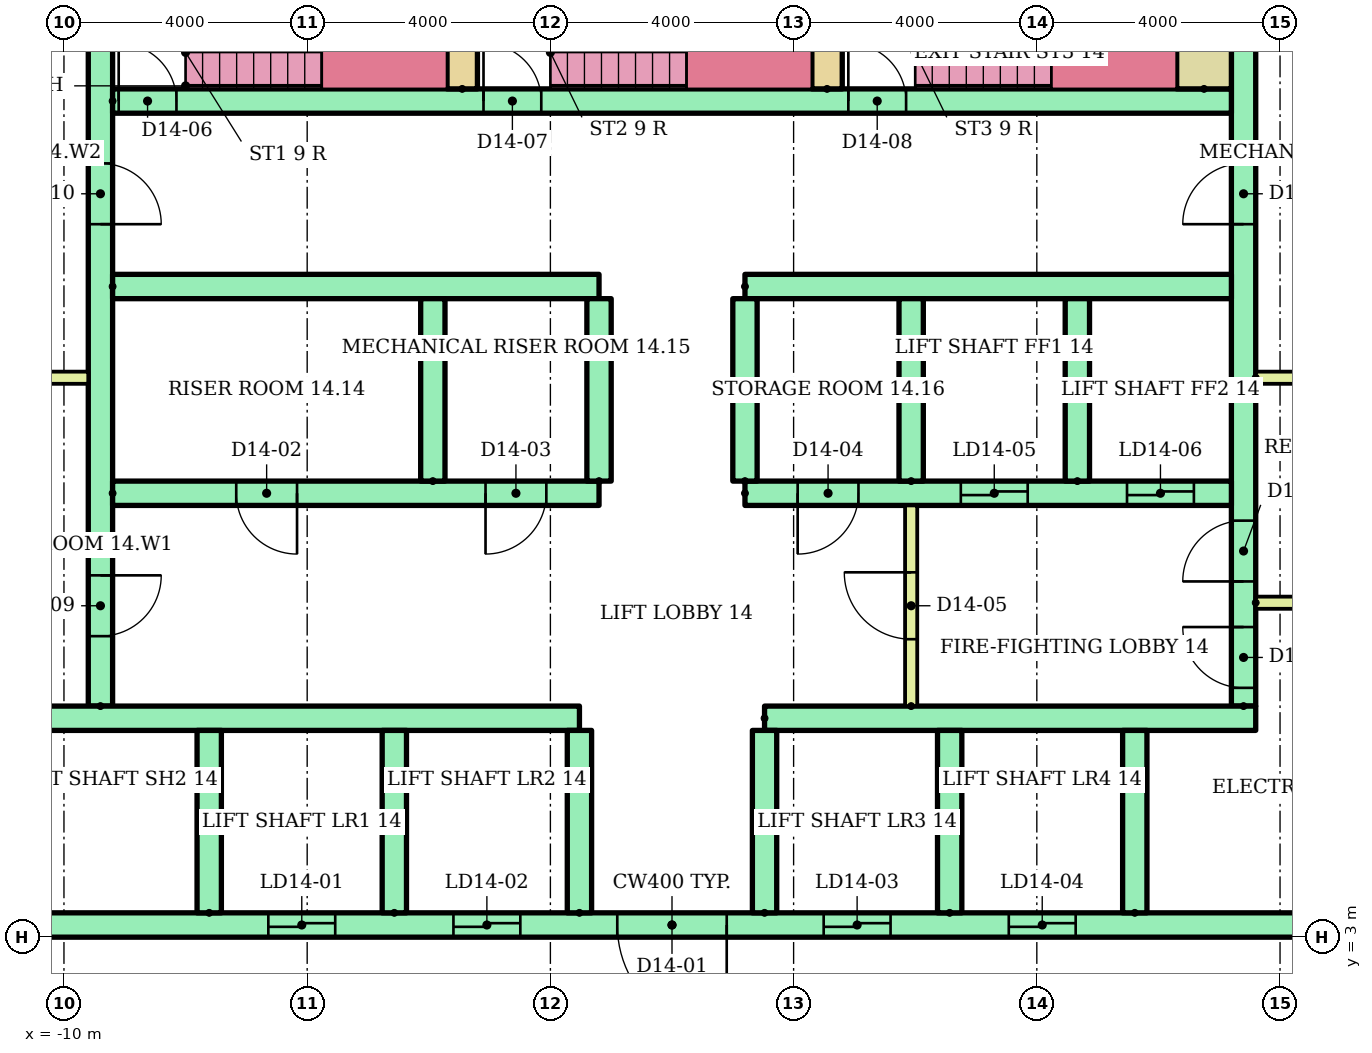
"""IFC4 building model, lengths in metres.
Left out: names, types, materials, properties, quantities, classifications, styles, units other than length and angle.
Written with IfcOpenShell. Run it as: python <this file> out.ifc"""

import sys

from ifc_helpers import new_model, si_unit, direction, frame, frame_2d, origin, place, context, subcontext, project, spatial, rectangle, extrude, element, fill, save


model = new_model("IFC4")
c1 = context("Model", 3, precision=1e-05, world=origin(), true_north=direction((0.0, 1.0)))
c2 = subcontext(c1, "Body", "Model", "MODEL_VIEW")
j1 = project(units=[si_unit("LENGTHUNIT", "METRE"), si_unit("PLANEANGLEUNIT", "RADIAN")], contexts=[c1])
p1 = place(None, origin())
s1 = spatial("IfcSite", under=j1, at=p1, CompositionType="ELEMENT")
p2 = place(p1, origin())
s2 = spatial("IfcBuilding", under=s1, at=p2, CompositionType="ELEMENT")
p3 = place(p2, frame((0.0, 0.0, 54.4)))
s3 = spatial("IfcBuildingStorey", under=s2, at=p3, CompositionType="ELEMENT", Elevation=54.4)
p4 = place(p3, frame((-9.4, 6.8, 0.0), z_axis=(0.0, 0.0, 1.0), x_axis=(0.0, 1.0, 0.0)))
e1 = element("IfcWall", 1, at=p4, inside=s3, PredefinedType="SHEAR", context=c2, shape_type="SweptSolid", body=[
    extrude(rectangle(XDim=12.7, YDim=0.4, at=frame_2d((6.35, 0.0))), origin(), (0.0, 0.0, 1.0), 2.92),
])
p5 = place(p4, frame((1.15, 0.0, 0.0)))
e2 = element("IfcOpeningElement", 2, at=p5, cuts=e1, PredefinedType="OPENING", context=c2, shape_type="SweptSolid", body=[
    extrude(rectangle(XDim=1.0, YDim=2.1, at=frame_2d((0.5, 1.05))), frame((0.0, 0.21, 0.0), z_axis=(0.0, -1.0, 0.0), x_axis=(1.0, 0.0, 0.0)), (0.0, 0.0, 1.0), 0.42),
])
p6 = place(p4, frame((7.925, 0.0, 0.0)))
e3 = element("IfcOpeningElement", 3, at=p6, cuts=e1, PredefinedType="OPENING", context=c2, shape_type="SweptSolid", body=[
    extrude(rectangle(XDim=1.0, YDim=2.1, at=frame_2d((0.5, 1.05))), frame((0.0, 0.21, 0.0), z_axis=(0.0, -1.0, 0.0), x_axis=(1.0, 0.0, 0.0)), (0.0, 0.0, 1.0), 0.42),
])
p7 = place(p3, frame((9.4, 6.8, 0.0), z_axis=(0.0, 0.0, 1.0), x_axis=(0.0, 1.0, 0.0)))
e4 = element("IfcWall", 4, at=p7, inside=s3, PredefinedType="SHEAR", context=c2, shape_type="SweptSolid", body=[
    extrude(rectangle(XDim=12.7, YDim=0.4, at=frame_2d((6.35, 0.0))), origin(), (0.0, 0.0, 1.0), 2.92),
])
p8 = place(p7, frame((0.3, 0.0, 0.0)))
e5 = element("IfcOpeningElement", 5, at=p8, cuts=e4, PredefinedType="OPENING", context=c2, shape_type="SweptSolid", body=[
    extrude(rectangle(XDim=1.0, YDim=2.1, at=frame_2d((0.5, 1.05))), frame((0.0, 0.21, 0.0), z_axis=(0.0, -1.0, 0.0), x_axis=(1.0, 0.0, 0.0)), (0.0, 0.0, 1.0), 0.42),
])
p9 = place(p7, frame((2.05, 0.0, 0.0)))
e6 = element("IfcOpeningElement", 6, at=p9, cuts=e4, PredefinedType="OPENING", context=c2, shape_type="SweptSolid", body=[
    extrude(rectangle(XDim=1.0, YDim=2.1, at=frame_2d((0.5, 1.05))), frame((0.0, 0.21, 0.0), z_axis=(0.0, -1.0, 0.0), x_axis=(1.0, 0.0, 0.0)), (0.0, 0.0, 1.0), 0.42),
])
p10 = place(p7, frame((7.925, 0.0, 0.0)))
e7 = element("IfcOpeningElement", 7, at=p10, cuts=e4, PredefinedType="OPENING", context=c2, shape_type="SweptSolid", body=[
    extrude(rectangle(XDim=1.0, YDim=2.1, at=frame_2d((0.5, 1.05))), frame((0.0, 0.21, 0.0), z_axis=(0.0, -1.0, 0.0), x_axis=(1.0, 0.0, 0.0)), (0.0, 0.0, 1.0), 0.42),
])
p11 = place(p3, frame((-13.5, 3.2, 0.0)))
e8 = element("IfcWall", 8, at=p11, inside=s3, PredefinedType="SHEAR", context=c2, shape_type="SweptSolid", body=[
    extrude(rectangle(XDim=27.0, YDim=0.4, at=frame_2d((13.5, 0.0))), origin(), (0.0, 0.0, 1.0), 2.92),
])
p12 = place(p11, frame((6.861, 0.0, 0.0)))
e9 = element("IfcOpeningElement", 9, at=p12, cuts=e8, PredefinedType="OPENING", context=c2, shape_type="SweptSolid", body=[
    extrude(rectangle(XDim=1.1, YDim=2.1, at=frame_2d((0.55, 1.05))), frame((0.0, 0.21, 0.0), z_axis=(0.0, -1.0, 0.0), x_axis=(1.0, 0.0, 0.0)), (0.0, 0.0, 1.0), 0.42),
])
p13 = place(p11, frame((9.906, 0.0, 0.0)))
e10 = element("IfcOpeningElement", 10, at=p13, cuts=e8, PredefinedType="OPENING", context=c2, shape_type="SweptSolid", body=[
    extrude(rectangle(XDim=1.1, YDim=2.1, at=frame_2d((0.55, 1.05))), frame((0.0, 0.21, 0.0), z_axis=(0.0, -1.0, 0.0), x_axis=(1.0, 0.0, 0.0)), (0.0, 0.0, 1.0), 0.42),
])
p14 = place(p11, frame((15.994, 0.0, 0.0)))
e11 = element("IfcOpeningElement", 11, at=p14, cuts=e8, PredefinedType="OPENING", context=c2, shape_type="SweptSolid", body=[
    extrude(rectangle(XDim=1.1, YDim=2.1, at=frame_2d((0.55, 1.05))), frame((0.0, 0.21, 0.0), z_axis=(0.0, -1.0, 0.0), x_axis=(1.0, 0.0, 0.0)), (0.0, 0.0, 1.0), 0.42),
])
p15 = place(p11, frame((19.039, 0.0, 0.0)))
e12 = element("IfcOpeningElement", 12, at=p15, cuts=e8, PredefinedType="OPENING", context=c2, shape_type="SweptSolid", body=[
    extrude(rectangle(XDim=1.1, YDim=2.1, at=frame_2d((0.55, 1.05))), frame((0.0, 0.21, 0.0), z_axis=(0.0, -1.0, 0.0), x_axis=(1.0, 0.0, 0.0)), (0.0, 0.0, 1.0), 0.42),
])
p16 = place(p11, frame((12.6, 0.0, 0.0)))
e13 = element("IfcOpeningElement", 13, at=p16, cuts=e8, PredefinedType="OPENING", context=c2, shape_type="SweptSolid", body=[
    extrude(rectangle(XDim=1.8, YDim=2.1, at=frame_2d((0.9, 1.05))), frame((0.0, 0.21, 0.0), z_axis=(0.0, -1.0, 0.0), x_axis=(1.0, 0.0, 0.0)), (0.0, 0.0, 1.0), 0.42),
])
p17 = place(p3, frame((-13.5, 6.6, 0.0)))
e14 = element("IfcWall", 14, at=p17, inside=s3, PredefinedType="SHEAR", context=c2, shape_type="SweptSolid", body=[
    extrude(rectangle(XDim=11.978, YDim=0.4, at=frame_2d((5.989, 0.0))), origin(), (0.0, 0.0, 1.0), 2.92),
])
p18 = place(p3, frame((1.522, 6.6, 0.0)))
e15 = element("IfcWall", 15, at=p18, inside=s3, PredefinedType="SHEAR", context=c2, shape_type="SweptSolid", body=[
    extrude(rectangle(XDim=8.078, YDim=0.4, at=frame_2d((4.039, 0.0))), origin(), (0.0, 0.0, 1.0), 2.92),
])
for number, where, z_axis, x_axis in (
    (16, (-7.611, 3.4, 0.0), (0.0, 0.0, 1.0), (0.0, 1.0, 0.0)),
    (17, (-4.567, 3.4, 0.0), (0.0, 0.0, 1.0), (0.0, 1.0, 0.0)),
    (18, (-1.522, 3.4, 0.0), (0.0, 0.0, 1.0), (0.0, 1.0, 0.0)),
    (19, (1.522, 3.4, 0.0), (0.0, 0.0, 1.0), (0.0, 1.0, 0.0)),
    (20, (4.567, 3.4, 0.0), (0.0, 0.0, 1.0), (0.0, 1.0, 0.0)),
    (21, (7.611, 3.4, 0.0), (0.0, 0.0, 1.0), (0.0, 1.0, 0.0)),
):
    element("IfcWall", number, at=place(p3, frame(where, z_axis=z_axis, x_axis=x_axis)), inside=s3, PredefinedType="SHEAR", context=c2, shape_type="SweptSolid", body=[
        extrude(rectangle(XDim=3.0, YDim=0.4, at=frame_2d((1.5, 0.0))), origin(), (0.0, 0.0, 1.0), 2.92),
    ])
p19 = place(p3, frame((-9.2, 10.3, 0.0)))
e22 = element("IfcWall", 22, at=p19, inside=s3, PredefinedType="SHEAR", context=c2, shape_type="SweptSolid", body=[
    extrude(rectangle(XDim=8.0, YDim=0.4, at=frame_2d((4.0, 0.0))), origin(), (0.0, 0.0, 1.0), 2.92),
])
p20 = place(p19, frame((2.033, 0.0, 0.0)))
e23 = element("IfcOpeningElement", 23, at=p20, cuts=e22, PredefinedType="OPENING", context=c2, shape_type="SweptSolid", body=[
    extrude(rectangle(XDim=1.0, YDim=2.1, at=frame_2d((0.5, 1.05))), frame((0.0, 0.21, 0.0), z_axis=(0.0, -1.0, 0.0), x_axis=(1.0, 0.0, 0.0)), (0.0, 0.0, 1.0), 0.42),
])
p21 = place(p19, frame((6.133, 0.0, 0.0)))
e24 = element("IfcOpeningElement", 24, at=p21, cuts=e22, PredefinedType="OPENING", context=c2, shape_type="SweptSolid", body=[
    extrude(rectangle(XDim=1.0, YDim=2.1, at=frame_2d((0.5, 1.05))), frame((0.0, 0.21, 0.0), z_axis=(0.0, -1.0, 0.0), x_axis=(1.0, 0.0, 0.0)), (0.0, 0.0, 1.0), 0.42),
])
p22 = place(p3, frame((-9.2, 13.7, 0.0)))
e25 = element("IfcWall", 25, at=p22, inside=s3, PredefinedType="SHEAR", context=c2, shape_type="SweptSolid", body=[
    extrude(rectangle(XDim=8.0, YDim=0.4, at=frame_2d((4.0, 0.0))), origin(), (0.0, 0.0, 1.0), 2.92),
])
p23 = place(p3, frame((1.2, 10.3, 0.0)))
e26 = element("IfcWall", 26, at=p23, inside=s3, PredefinedType="SHEAR", context=c2, shape_type="SweptSolid", body=[
    extrude(rectangle(XDim=8.0, YDim=0.4, at=frame_2d((4.0, 0.0))), origin(), (0.0, 0.0, 1.0), 2.92),
])
p24 = place(p23, frame((3.55, 0.0, 0.0)))
e27 = element("IfcOpeningElement", 27, at=p24, cuts=e26, PredefinedType="OPENING", context=c2, shape_type="SweptSolid", body=[
    extrude(rectangle(XDim=1.1, YDim=2.1, at=frame_2d((0.55, 1.05))), frame((0.0, 0.21, 0.0), z_axis=(0.0, -1.0, 0.0), x_axis=(1.0, 0.0, 0.0)), (0.0, 0.0, 1.0), 0.42),
])
p25 = place(p23, frame((6.283, 0.0, 0.0)))
e28 = element("IfcOpeningElement", 28, at=p25, cuts=e26, PredefinedType="OPENING", context=c2, shape_type="SweptSolid", body=[
    extrude(rectangle(XDim=1.1, YDim=2.1, at=frame_2d((0.55, 1.05))), frame((0.0, 0.21, 0.0), z_axis=(0.0, -1.0, 0.0), x_axis=(1.0, 0.0, 0.0)), (0.0, 0.0, 1.0), 0.42),
])
p26 = place(p23, frame((0.867, 0.0, 0.0)))
e29 = element("IfcOpeningElement", 29, at=p26, cuts=e26, PredefinedType="OPENING", context=c2, shape_type="SweptSolid", body=[
    extrude(rectangle(XDim=1.0, YDim=2.1, at=frame_2d((0.5, 1.05))), frame((0.0, 0.21, 0.0), z_axis=(0.0, -1.0, 0.0), x_axis=(1.0, 0.0, 0.0)), (0.0, 0.0, 1.0), 0.42),
])
p27 = place(p3, frame((1.2, 13.7, 0.0)))
e30 = element("IfcWall", 30, at=p27, inside=s3, PredefinedType="SHEAR", context=c2, shape_type="SweptSolid", body=[
    extrude(rectangle(XDim=8.0, YDim=0.4, at=frame_2d((4.0, 0.0))), origin(), (0.0, 0.0, 1.0), 2.92),
])
for number, where, z_axis, x_axis in (
    (31, (-3.933, 10.5, 0.0), (0.0, 0.0, 1.0), (0.0, 1.0, 0.0)),
    (32, (-1.2, 10.5, 0.0), (0.0, 0.0, 1.0), (0.0, 1.0, 0.0)),
    (33, (1.2, 10.5, 0.0), (0.0, 0.0, 1.0), (0.0, 1.0, 0.0)),
    (34, (3.933, 10.5, 0.0), (0.0, 0.0, 1.0), (0.0, 1.0, 0.0)),
    (35, (6.667, 10.5, 0.0), (0.0, 0.0, 1.0), (0.0, 1.0, 0.0)),
):
    element("IfcWall", number, at=place(p3, frame(where, z_axis=z_axis, x_axis=x_axis)), inside=s3, PredefinedType="SHEAR", context=c2, shape_type="SweptSolid", body=[
        extrude(rectangle(XDim=3.0, YDim=0.4, at=frame_2d((1.5, 0.0))), origin(), (0.0, 0.0, 1.0), 2.92),
    ])
p28 = place(p3, frame((3.933, 6.8, 0.0), z_axis=(0.0, 0.0, 1.0), x_axis=(0.0, 1.0, 0.0)))
e36 = element("IfcWall", 36, at=p28, inside=s3, PredefinedType="PARTITIONING", context=c2, shape_type="SweptSolid", body=[
    extrude(rectangle(XDim=3.3, YDim=0.2, at=frame_2d((1.65, 0.0))), origin(), (0.0, 0.0, 1.0), 2.92),
])
p29 = place(p28, frame((1.1, 0.0, 0.0)))
e37 = element("IfcOpeningElement", 37, at=p29, cuts=e36, PredefinedType="OPENING", context=c2, shape_type="SweptSolid", body=[
    extrude(rectangle(XDim=1.1, YDim=2.1, at=frame_2d((0.55, 1.05))), frame((0.0, 0.11, 0.0), z_axis=(0.0, -1.0, 0.0), x_axis=(1.0, 0.0, 0.0)), (0.0, 0.0, 1.0), 0.22),
])
p30 = place(p3, frame((-9.2, 16.75, 0.0)))
e38 = element("IfcWall", 38, at=p30, inside=s3, PredefinedType="SHEAR", context=c2, shape_type="SweptSolid", body=[
    extrude(rectangle(XDim=18.4, YDim=0.4, at=frame_2d((9.2, 0.0))), origin(), (0.0, 0.0, 1.0), 2.92),
])
p31 = place(p30, frame((0.1, 0.0, 0.0)))
e39 = element("IfcOpeningElement", 39, at=p31, cuts=e38, PredefinedType="OPENING", context=c2, shape_type="SweptSolid", body=[
    extrude(rectangle(XDim=0.95, YDim=2.1, at=frame_2d((0.475, 1.05))), frame((0.0, 0.21, 0.0), z_axis=(0.0, -1.0, 0.0), x_axis=(1.0, 0.0, 0.0)), (0.0, 0.0, 1.0), 0.42),
])
p32 = place(p30, frame((6.1, 0.0, 0.0)))
e40 = element("IfcOpeningElement", 40, at=p32, cuts=e38, PredefinedType="OPENING", context=c2, shape_type="SweptSolid", body=[
    extrude(rectangle(XDim=0.95, YDim=2.1, at=frame_2d((0.475, 1.05))), frame((0.0, 0.21, 0.0), z_axis=(0.0, -1.0, 0.0), x_axis=(1.0, 0.0, 0.0)), (0.0, 0.0, 1.0), 0.42),
])
p33 = place(p30, frame((12.1, 0.0, 0.0)))
e41 = element("IfcOpeningElement", 41, at=p33, cuts=e38, PredefinedType="OPENING", context=c2, shape_type="SweptSolid", body=[
    extrude(rectangle(XDim=0.95, YDim=2.1, at=frame_2d((0.475, 1.05))), frame((0.0, 0.21, 0.0), z_axis=(0.0, -1.0, 0.0), x_axis=(1.0, 0.0, 0.0)), (0.0, 0.0, 1.0), 0.42),
])
for number, where, z_axis, x_axis in (
    (42, (-3.45, 16.95, 0.0), (0.0, 0.0, 1.0), (0.0, 1.0, 0.0)),
    (43, (2.55, 16.95, 0.0), (0.0, 0.0, 1.0), (0.0, 1.0, 0.0)),
):
    element("IfcWall", number, at=place(p3, frame(where, z_axis=z_axis, x_axis=x_axis)), inside=s3, PredefinedType="SHEAR", context=c2, shape_type="SweptSolid", body=[
        extrude(rectangle(XDim=2.55, YDim=0.5, at=frame_2d((1.275, 0.0))), origin(), (0.0, 0.0, 1.0), 2.92),
    ])
p34 = place(p3, frame((8.75, 16.95, 0.0), z_axis=(0.0, 0.0, 1.0), x_axis=(0.0, 1.0, 0.0)))
e44 = element("IfcWall", 44, at=p34, inside=s3, PredefinedType="SHEAR", context=c2, shape_type="SweptSolid", body=[
    extrude(rectangle(XDim=2.55, YDim=0.9, at=frame_2d((1.275, 0.0))), origin(), (0.0, 0.0, 1.0), 2.92),
])
for number, where in (
    (45, (-13.5, 12.2, 0.0)),
    (46, (9.6, 8.5, 0.0)),
    (47, (9.6, 12.2, 0.0)),
):
    element("IfcWall", number, at=place(p3, frame(where)), inside=s3, PredefinedType="PARTITIONING", context=c2, shape_type="SweptSolid", body=[
        extrude(rectangle(XDim=3.9, YDim=0.2, at=frame_2d((1.95, 0.0))), origin(), (0.0, 0.0, 1.0), 2.92),
    ])
p35 = place(p12, origin())
e48 = element("IfcDoor", 48, at=p35, inside=s3, OperationType="SLIDING_TO_LEFT", PredefinedType="DOOR", context=c2, shape_type="SweptSolid", body=[
    extrude(rectangle(XDim=1.1, YDim=2.1, at=frame_2d((0.55, 1.05))), frame((0.0, 0.025, 0.0), z_axis=(0.0, -1.0, 0.0), x_axis=(1.0, 0.0, 0.0)), (0.0, 0.0, 1.0), 0.05),
])
fill(e9, e48)
p36 = place(p13, origin())
e49 = element("IfcDoor", 49, at=p36, inside=s3, OperationType="SLIDING_TO_LEFT", PredefinedType="DOOR", context=c2, shape_type="SweptSolid", body=[
    extrude(rectangle(XDim=1.1, YDim=2.1, at=frame_2d((0.55, 1.05))), frame((0.0, 0.025, 0.0), z_axis=(0.0, -1.0, 0.0), x_axis=(1.0, 0.0, 0.0)), (0.0, 0.0, 1.0), 0.05),
])
fill(e10, e49)
p37 = place(p14, origin())
e50 = element("IfcDoor", 50, at=p37, inside=s3, OperationType="SLIDING_TO_LEFT", PredefinedType="DOOR", context=c2, shape_type="SweptSolid", body=[
    extrude(rectangle(XDim=1.1, YDim=2.1, at=frame_2d((0.55, 1.05))), frame((0.0, 0.025, 0.0), z_axis=(0.0, -1.0, 0.0), x_axis=(1.0, 0.0, 0.0)), (0.0, 0.0, 1.0), 0.05),
])
fill(e11, e50)
p38 = place(p15, origin())
e51 = element("IfcDoor", 51, at=p38, inside=s3, OperationType="SLIDING_TO_LEFT", PredefinedType="DOOR", context=c2, shape_type="SweptSolid", body=[
    extrude(rectangle(XDim=1.1, YDim=2.1, at=frame_2d((0.55, 1.05))), frame((0.0, 0.025, 0.0), z_axis=(0.0, -1.0, 0.0), x_axis=(1.0, 0.0, 0.0)), (0.0, 0.0, 1.0), 0.05),
])
fill(e12, e51)
p39 = place(p16, frame((1.8, 0.0, 0.0), z_axis=(0.0, 0.0, 1.0), x_axis=(-1.0, 0.0, 0.0)))
e52 = element("IfcDoor", 52, at=p39, inside=s3, OperationType="DOUBLE_DOOR_SINGLE_SWING", PredefinedType="DOOR", context=c2, shape_type="SweptSolid", body=[
    extrude(rectangle(XDim=1.8, YDim=2.1, at=frame_2d((0.9, 1.05))), frame((0.0, 0.025, 0.0), z_axis=(0.0, -1.0, 0.0), x_axis=(1.0, 0.0, 0.0)), (0.0, 0.0, 1.0), 0.05),
])
fill(e13, e52)
p40 = place(p24, origin())
e53 = element("IfcDoor", 53, at=p40, inside=s3, OperationType="SLIDING_TO_LEFT", PredefinedType="DOOR", context=c2, shape_type="SweptSolid", body=[
    extrude(rectangle(XDim=1.1, YDim=2.1, at=frame_2d((0.55, 1.05))), frame((0.0, 0.025, 0.0), z_axis=(0.0, -1.0, 0.0), x_axis=(1.0, 0.0, 0.0)), (0.0, 0.0, 1.0), 0.05),
])
fill(e27, e53)
p41 = place(p25, origin())
e54 = element("IfcDoor", 54, at=p41, inside=s3, OperationType="SLIDING_TO_LEFT", PredefinedType="DOOR", context=c2, shape_type="SweptSolid", body=[
    extrude(rectangle(XDim=1.1, YDim=2.1, at=frame_2d((0.55, 1.05))), frame((0.0, 0.025, 0.0), z_axis=(0.0, -1.0, 0.0), x_axis=(1.0, 0.0, 0.0)), (0.0, 0.0, 1.0), 0.05),
])
fill(e28, e54)
p42 = place(p20, frame((1.0, 0.0, 0.0), z_axis=(0.0, 0.0, 1.0), x_axis=(-1.0, 0.0, 0.0)))
e55 = element("IfcDoor", 55, at=p42, inside=s3, OperationType="SINGLE_SWING_RIGHT", PredefinedType="DOOR", context=c2, shape_type="SweptSolid", body=[
    extrude(rectangle(XDim=1.0, YDim=2.1, at=frame_2d((0.5, 1.05))), frame((0.0, 0.025, 0.0), z_axis=(0.0, -1.0, 0.0), x_axis=(1.0, 0.0, 0.0)), (0.0, 0.0, 1.0), 0.05),
])
fill(e23, e55)
p43 = place(p21, frame((1.0, 0.0, 0.0), z_axis=(0.0, 0.0, 1.0), x_axis=(-1.0, 0.0, 0.0)))
e56 = element("IfcDoor", 56, at=p43, inside=s3, OperationType="SINGLE_SWING_LEFT", PredefinedType="DOOR", context=c2, shape_type="SweptSolid", body=[
    extrude(rectangle(XDim=1.0, YDim=2.1, at=frame_2d((0.5, 1.05))), frame((0.0, 0.025, 0.0), z_axis=(0.0, -1.0, 0.0), x_axis=(1.0, 0.0, 0.0)), (0.0, 0.0, 1.0), 0.05),
])
fill(e24, e56)
p44 = place(p26, frame((1.0, 0.0, 0.0), z_axis=(0.0, 0.0, 1.0), x_axis=(-1.0, 0.0, 0.0)))
e57 = element("IfcDoor", 57, at=p44, inside=s3, OperationType="SINGLE_SWING_LEFT", PredefinedType="DOOR", context=c2, shape_type="SweptSolid", body=[
    extrude(rectangle(XDim=1.0, YDim=2.1, at=frame_2d((0.5, 1.05))), frame((0.0, 0.025, 0.0), z_axis=(0.0, -1.0, 0.0), x_axis=(1.0, 0.0, 0.0)), (0.0, 0.0, 1.0), 0.05),
])
fill(e29, e57)
p45 = place(p29, origin())
e58 = element("IfcDoor", 58, at=p45, inside=s3, OperationType="SINGLE_SWING_RIGHT", PredefinedType="DOOR", context=c2, shape_type="SweptSolid", body=[
    extrude(rectangle(XDim=1.1, YDim=2.1, at=frame_2d((0.55, 1.05))), frame((0.0, 0.025, 0.0), z_axis=(0.0, -1.0, 0.0), x_axis=(1.0, 0.0, 0.0)), (0.0, 0.0, 1.0), 0.05),
])
fill(e37, e58)
p46 = place(p31, origin())
e59 = element("IfcDoor", 59, at=p46, inside=s3, OperationType="SINGLE_SWING_LEFT", PredefinedType="DOOR", context=c2, shape_type="SweptSolid", body=[
    extrude(rectangle(XDim=0.95, YDim=2.1, at=frame_2d((0.475, 1.05))), frame((0.0, 0.025, 0.0), z_axis=(0.0, -1.0, 0.0), x_axis=(1.0, 0.0, 0.0)), (0.0, 0.0, 1.0), 0.05),
])
fill(e39, e59)
p47 = place(p32, origin())
e60 = element("IfcDoor", 60, at=p47, inside=s3, OperationType="SINGLE_SWING_LEFT", PredefinedType="DOOR", context=c2, shape_type="SweptSolid", body=[
    extrude(rectangle(XDim=0.95, YDim=2.1, at=frame_2d((0.475, 1.05))), frame((0.0, 0.025, 0.0), z_axis=(0.0, -1.0, 0.0), x_axis=(1.0, 0.0, 0.0)), (0.0, 0.0, 1.0), 0.05),
])
fill(e40, e60)
p48 = place(p33, origin())
e61 = element("IfcDoor", 61, at=p48, inside=s3, OperationType="SINGLE_SWING_LEFT", PredefinedType="DOOR", context=c2, shape_type="SweptSolid", body=[
    extrude(rectangle(XDim=0.95, YDim=2.1, at=frame_2d((0.475, 1.05))), frame((0.0, 0.025, 0.0), z_axis=(0.0, -1.0, 0.0), x_axis=(1.0, 0.0, 0.0)), (0.0, 0.0, 1.0), 0.05),
])
fill(e41, e61)
p49 = place(p5, frame((1.0, 0.0, 0.0), z_axis=(0.0, 0.0, 1.0), x_axis=(-1.0, 0.0, 0.0)))
e62 = element("IfcDoor", 62, at=p49, inside=s3, OperationType="SINGLE_SWING_RIGHT", PredefinedType="DOOR", context=c2, shape_type="SweptSolid", body=[
    extrude(rectangle(XDim=1.0, YDim=2.1, at=frame_2d((0.5, 1.05))), frame((0.0, 0.025, 0.0), z_axis=(0.0, -1.0, 0.0), x_axis=(1.0, 0.0, 0.0)), (0.0, 0.0, 1.0), 0.05),
])
fill(e2, e62)
p50 = place(p6, frame((1.0, 0.0, 0.0), z_axis=(0.0, 0.0, 1.0), x_axis=(-1.0, 0.0, 0.0)))
e63 = element("IfcDoor", 63, at=p50, inside=s3, OperationType="SINGLE_SWING_LEFT", PredefinedType="DOOR", context=c2, shape_type="SweptSolid", body=[
    extrude(rectangle(XDim=1.0, YDim=2.1, at=frame_2d((0.5, 1.05))), frame((0.0, 0.025, 0.0), z_axis=(0.0, -1.0, 0.0), x_axis=(1.0, 0.0, 0.0)), (0.0, 0.0, 1.0), 0.05),
])
fill(e3, e63)
p51 = place(p8, origin())
e64 = element("IfcDoor", 64, at=p51, inside=s3, OperationType="SINGLE_SWING_RIGHT", PredefinedType="DOOR", context=c2, shape_type="SweptSolid", body=[
    extrude(rectangle(XDim=1.0, YDim=2.1, at=frame_2d((0.5, 1.05))), frame((0.0, 0.025, 0.0), z_axis=(0.0, -1.0, 0.0), x_axis=(1.0, 0.0, 0.0)), (0.0, 0.0, 1.0), 0.05),
])
fill(e5, e64)
p52 = place(p9, origin())
e65 = element("IfcDoor", 65, at=p52, inside=s3, OperationType="SINGLE_SWING_LEFT", PredefinedType="DOOR", context=c2, shape_type="SweptSolid", body=[
    extrude(rectangle(XDim=1.0, YDim=2.1, at=frame_2d((0.5, 1.05))), frame((0.0, 0.025, 0.0), z_axis=(0.0, -1.0, 0.0), x_axis=(1.0, 0.0, 0.0)), (0.0, 0.0, 1.0), 0.05),
])
fill(e6, e65)
p53 = place(p10, origin())
e66 = element("IfcDoor", 66, at=p53, inside=s3, OperationType="SINGLE_SWING_LEFT", PredefinedType="DOOR", context=c2, shape_type="SweptSolid", body=[
    extrude(rectangle(XDim=1.0, YDim=2.1, at=frame_2d((0.5, 1.05))), frame((0.0, 0.025, 0.0), z_axis=(0.0, -1.0, 0.0), x_axis=(1.0, 0.0, 0.0)), (0.0, 0.0, 1.0), 0.05),
])
fill(e7, e66)
save(model, sys.argv[1])
